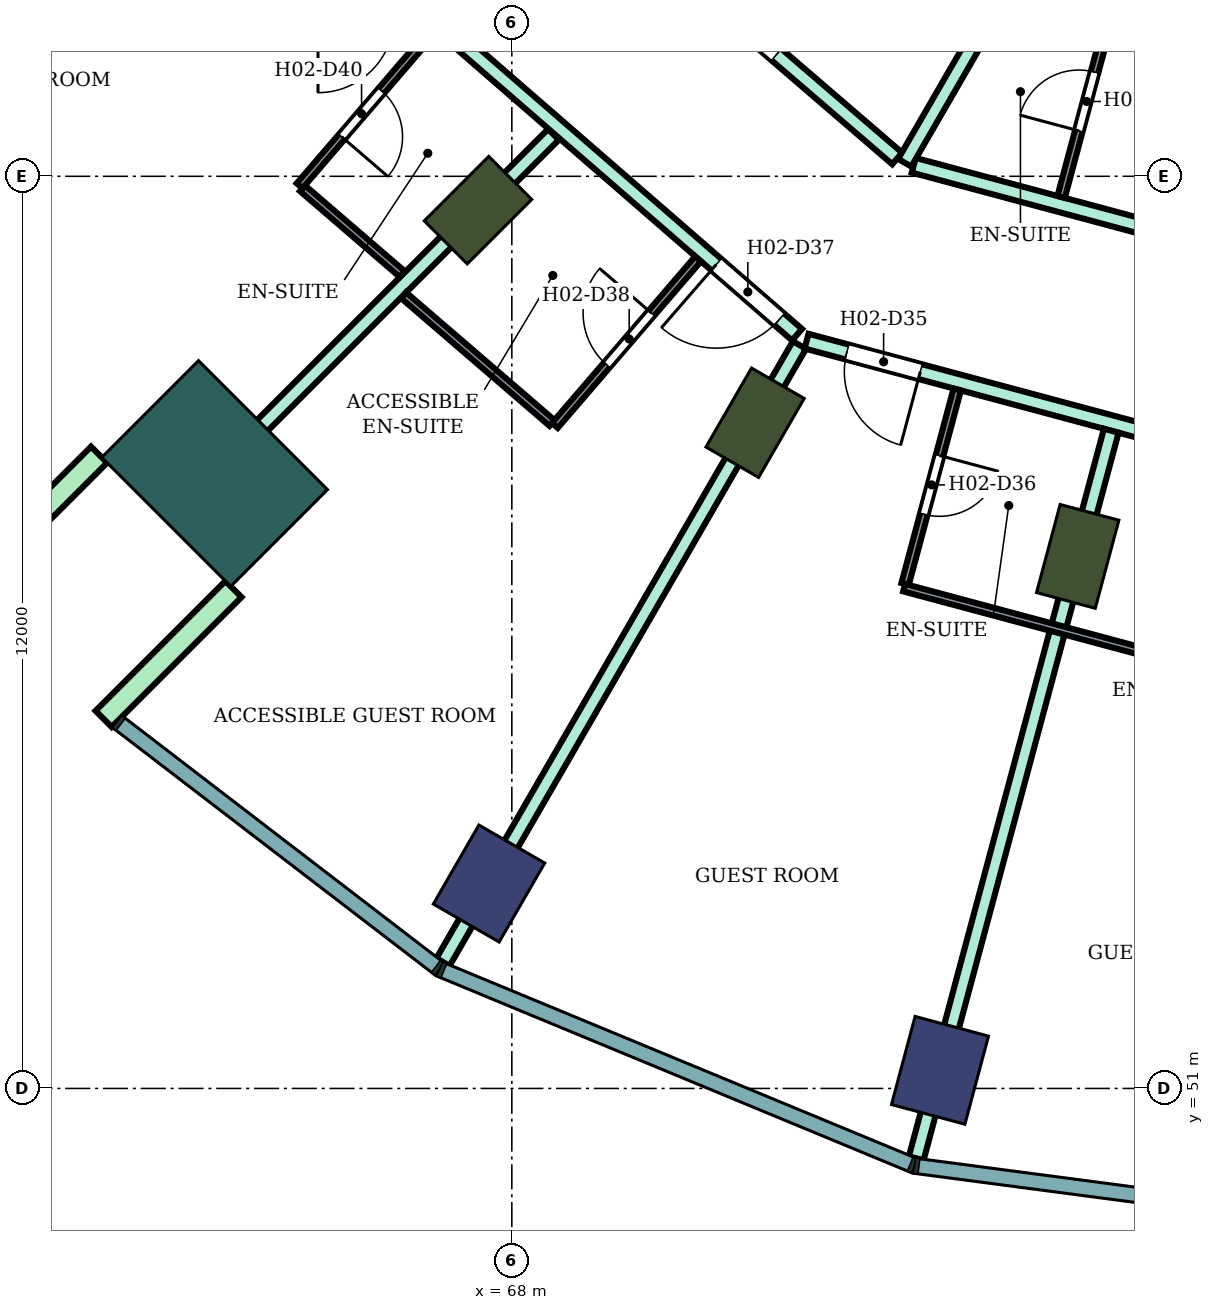
"""IFC4 building model, lengths in metres.
Left out: names, types, materials, properties, quantities, classifications, styles, units other than length and angle.
Written with IfcOpenShell. Run it as: python <this file> out.ifc"""

import sys

from ifc_helpers import new_model, si_unit, direction, frame, frame_2d, origin, origin_2d, place, context, subcontext, project, spatial, rectangle, extrude, element, fill, save


model = new_model("IFC4")
c1 = context("Model", 3, precision=1e-05, world=origin(), true_north=direction((0.0, 1.0)))
c2 = subcontext(c1, "Body", "Model", "MODEL_VIEW")
j1 = project(units=[si_unit("LENGTHUNIT", "METRE"), si_unit("PLANEANGLEUNIT", "RADIAN")], contexts=[c1])
p1 = place(None, origin())
s1 = spatial("IfcSite", under=j1, at=p1, CompositionType="ELEMENT")
p2 = place(p1, origin())
s2 = spatial("IfcBuilding", under=s1, at=p2, CompositionType="ELEMENT")
p3 = place(p2, frame((0.0, 0.0, 40.2)))
s3 = spatial("IfcBuildingStorey", under=s2, at=p3, CompositionType="ELEMENT", Elevation=40.2)
for number, where, z_axis, x_axis in (
    (1, (67.7, 53.696, 0.0), (0.0, 0.0, 1.0), (-0.5, -0.866, 0.0)),
    (2, (73.633, 51.238, 0.0), (0.0, 0.0, 1.0), (-0.259, -0.966, 0.0)),
):
    element("IfcColumn", number, at=place(p3, frame(where, z_axis=z_axis, x_axis=x_axis)), inside=s3, PredefinedType="COLUMN", context=c2, shape_type="SweptSolid", body=[
        extrude(rectangle(XDim=1.2, YDim=1.0, at=origin_2d()), origin(), (0.0, 0.0, 1.0), 3.8),
    ])
for number, where, z_axis, x_axis in (
    (3, (67.555, 62.555, 0.0), (0.0, 0.0, 1.0), (-0.707, -0.707, 0.0)),
    (4, (71.2, 59.758, 0.0), (0.0, 0.0, 1.0), (-0.5, -0.866, 0.0)),
    (5, (75.445, 58.0, 0.0), (0.0, 0.0, 1.0), (-0.259, -0.966, 0.0)),
):
    element("IfcColumn", number, at=place(p3, frame(where, z_axis=z_axis, x_axis=x_axis)), inside=s3, PredefinedType="COLUMN", context=c2, shape_type="SweptSolid", body=[
        extrude(rectangle(XDim=1.2, YDim=0.8, at=origin_2d()), origin(), (0.0, 0.0, 1.0), 3.8),
    ])
p4 = place(p3, frame((64.09, 59.09, 0.0), z_axis=(0.0, 0.0, 1.0), x_axis=(-0.707106781187, -0.707106781187, 0.0)))
e6 = element("IfcColumn", 6, at=p4, inside=s3, PredefinedType="COLUMN", context=c2, shape_type="SweptSolid", body=[
    extrude(rectangle(XDim=1.8, YDim=2.4, at=origin_2d()), origin(), (0.0, 0.0, 1.0), 3.8),
])
for number, where, z_axis, x_axis in (
    (7, (62.57, 59.338, 0.0), (0.0, 0.0, 1.0), (-0.707, -0.707, 0.0)),
    (8, (64.338, 57.57, 0.0), (0.0, 0.0, 1.0), (-0.707, -0.707, 0.0)),
):
    element("IfcWall", number, at=place(p3, frame(where, z_axis=z_axis, x_axis=x_axis)), inside=s3, PredefinedType="NOTDEFINED", context=c2, shape_type="SweptSolid", body=[
        extrude(rectangle(XDim=2.416, YDim=0.3, at=frame_2d((1.208, 0.0))), origin(), (0.0, 0.0, 1.0), 3.8),
    ])
p5 = place(p3, frame((63.594, 58.598, 0.0), z_axis=(0.0, 0.0, 1.0), x_axis=(0.707228748718, 0.706984792613, 0.0)))
e9 = element("IfcWall", 9, at=p5, inside=s3, PredefinedType="PARTITIONING", context=c2, shape_type="SweptSolid", body=[
    extrude(rectangle(XDim=7.005, YDim=0.2, at=frame_2d((3.503, 0.0))), origin(), (0.0, 0.0, 1.0), 3.35),
])
p6 = place(p3, frame((67.082, 64.972, 0.0), z_axis=(0.0, 0.0, 1.0), x_axis=(0.755033632617, -0.655686063309, 0.0)))
e10 = element("IfcWall", 10, at=p6, inside=s3, PredefinedType="PARTITIONING", context=c2, shape_type="SweptSolid", body=[
    extrude(rectangle(XDim=6.185, YDim=0.2, at=frame_2d((3.093, 0.0))), origin(), (0.0, 0.0, 1.0), 3.35),
])
p7 = place(p6, frame((4.778, 0.0, 0.0)))
e11 = element("IfcOpeningElement", 11, at=p7, cuts=e10, PredefinedType="OPENING", context=c2, shape_type="SweptSolid", body=[
    extrude(rectangle(XDim=1.1, YDim=2.1, at=frame_2d((0.55, 1.05))), frame((0.0, 0.11, 0.0), z_axis=(0.0, -1.0, 0.0), x_axis=(1.0, 0.0, 0.0)), (0.0, 0.0, 1.0), 0.22),
])
p8 = place(p3, frame((67.094, 52.663, 0.0), z_axis=(0.0, 0.0, 1.0), x_axis=(0.500216854217, 0.865900166738, 0.0)))
e12 = element("IfcWall", 12, at=p8, inside=s3, PredefinedType="PARTITIONING", context=c2, shape_type="SweptSolid", body=[
    extrude(rectangle(XDim=9.375, YDim=0.2, at=frame_2d((4.688, 0.0))), origin(), (0.0, 0.0, 1.0), 3.35),
])
p9 = place(p3, frame((69.158, 66.6, 0.0), z_axis=(0.0, 0.0, 1.0), x_axis=(0.758063092745, -0.652181222835, 0.0)))
e13 = element("IfcWall", 13, at=p9, inside=s3, PredefinedType="PARTITIONING", context=c2, shape_type="SweptSolid", body=[
    extrude(rectangle(XDim=5.16, YDim=0.2, at=frame_2d((2.58, 0.0))), origin(), (0.0, 0.0, 1.0), 3.35),
])
p10 = place(p9, frame((2.165, 0.0, 0.0)))
e14 = element("IfcOpeningElement", 14, at=p10, cuts=e13, PredefinedType="OPENING", context=c2, shape_type="SweptSolid", body=[
    extrude(rectangle(XDim=0.9, YDim=2.1, at=frame_2d((0.45, 1.05))), frame((0.0, 0.11, 0.0), z_axis=(0.0, -1.0, 0.0), x_axis=(1.0, 0.0, 0.0)), (0.0, 0.0, 1.0), 0.22),
])
p11 = place(p3, frame((71.877, 60.832, 0.0), z_axis=(0.0, 0.0, 1.0), x_axis=(0.965852509869, -0.259092510851, 0.0)))
e15 = element("IfcWall", 15, at=p11, inside=s3, PredefinedType="PARTITIONING", context=c2, shape_type="SweptSolid", body=[
    extrude(rectangle(XDim=8.32, YDim=0.2, at=frame_2d((4.16, 0.0))), origin(), (0.0, 0.0, 1.0), 3.35),
])
p12 = place(p11, frame((6.86, 0.0, 0.0)))
e16 = element("IfcOpeningElement", 16, at=p12, cuts=e15, PredefinedType="OPENING", context=c2, shape_type="SweptSolid", body=[
    extrude(rectangle(XDim=1.0, YDim=2.1, at=frame_2d((0.5, 1.05))), frame((0.0, 0.11, 0.0), z_axis=(0.0, -1.0, 0.0), x_axis=(1.0, 0.0, 0.0)), (0.0, 0.0, 1.0), 0.22),
])
p13 = place(p11, frame((0.55, 0.0, 0.0)))
e17 = element("IfcOpeningElement", 17, at=p13, cuts=e15, PredefinedType="OPENING", context=c2, shape_type="SweptSolid", body=[
    extrude(rectangle(XDim=1.0, YDim=2.1, at=frame_2d((0.5, 1.05))), frame((0.0, 0.11, 0.0), z_axis=(0.0, -1.0, 0.0), x_axis=(1.0, 0.0, 0.0)), (0.0, 0.0, 1.0), 0.22),
])
p14 = place(p3, frame((73.287, 63.145, 0.0), z_axis=(0.0, 0.0, 1.0), x_axis=(0.965854200194, -0.259086209526, 0.0)))
e18 = element("IfcWall", 18, at=p14, inside=s3, PredefinedType="PARTITIONING", context=c2, shape_type="SweptSolid", body=[
    extrude(rectangle(XDim=6.82, YDim=0.2, at=frame_2d((3.41, 0.0))), origin(), (0.0, 0.0, 1.0), 3.35),
])
p15 = place(p14, frame((5.4, 0.0, 0.0)))
e19 = element("IfcOpeningElement", 19, at=p15, cuts=e18, PredefinedType="OPENING", context=c2, shape_type="SweptSolid", body=[
    extrude(rectangle(XDim=1.0, YDim=2.1, at=frame_2d((0.5, 1.05))), frame((0.0, 0.11, 0.0), z_axis=(0.0, -1.0, 0.0), x_axis=(1.0, 0.0, 0.0)), (0.0, 0.0, 1.0), 0.22),
])
p16 = place(p3, frame((73.169, 63.178, 0.0), z_axis=(0.0, 0.0, 1.0), x_axis=(0.50020860964, 0.865904929448, 0.0)))
e20 = element("IfcWall", 20, at=p16, inside=s3, PredefinedType="PARTITIONING", context=c2, shape_type="SweptSolid", body=[
    extrude(rectangle(XDim=5.955, YDim=0.2, at=frame_2d((2.978, 0.0))), origin(), (0.0, 0.0, 1.0), 3.35),
])
p17 = place(p3, frame((73.321, 50.081, 0.0), z_axis=(0.0, 0.0, 1.0), x_axis=(0.25891218439, 0.965900864879, 0.0)))
e21 = element("IfcWall", 21, at=p17, inside=s3, PredefinedType="PARTITIONING", context=c2, shape_type="SweptSolid", body=[
    extrude(rectangle(XDim=9.909, YDim=0.2, at=frame_2d((4.955, 0.0))), origin(), (0.0, 0.0, 1.0), 3.35),
])
p18 = place(p3, frame((65.246, 62.842, 0.0), z_axis=(0.0, 0.0, 1.0), x_axis=(0.758030338995, -0.652219292234, 0.0)))
e22 = element("IfcWall", 22, at=p18, inside=s3, PredefinedType="PARTITIONING", context=c2, shape_type="SweptSolid", body=[
    extrude(rectangle(XDim=1.73, YDim=0.1, at=frame_2d((0.865, 0.0))), origin(), (0.0, 0.0, 1.0), 3.35),
])
p19 = place(p3, frame((65.208, 62.875, 0.0), z_axis=(0.0, 0.0, 1.0), x_axis=(0.65205430601, 0.758172264076, 0.0)))
e23 = element("IfcWall", 23, at=p19, inside=s3, PredefinedType="PARTITIONING", context=c2, shape_type="SweptSolid", body=[
    extrude(rectangle(XDim=2.8, YDim=0.1, at=frame_2d((1.4, 0.0))), origin(), (0.0, 0.0, 1.0), 3.35),
])
p20 = place(p19, frame((0.85, 0.0, 0.0)))
e24 = element("IfcOpeningElement", 24, at=p20, cuts=e23, PredefinedType="OPENING", context=c2, shape_type="SweptSolid", body=[
    extrude(rectangle(XDim=0.8, YDim=2.1, at=frame_2d((0.4, 1.05))), frame((0.0, 0.06, 0.0), z_axis=(0.0, -1.0, 0.0), x_axis=(1.0, 0.0, 0.0)), (0.0, 0.0, 1.0), 0.12),
])
p21 = place(p3, frame((66.576, 61.435, 0.0), z_axis=(0.0, 0.0, 1.0), x_axis=(0.757970550281, -0.652288774169, 0.0)))
e25 = element("IfcWall", 25, at=p21, inside=s3, PredefinedType="PARTITIONING", context=c2, shape_type="SweptSolid", body=[
    extrude(rectangle(XDim=2.576, YDim=0.1, at=frame_2d((1.288, 0.0))), origin(), (0.0, 0.0, 1.0), 3.35),
])
p22 = place(p3, frame((68.566, 59.722, 0.0), z_axis=(0.0, 0.0, 1.0), x_axis=(0.65193146671, 0.758277892803, 0.0)))
e26 = element("IfcWall", 26, at=p22, inside=s3, PredefinedType="PARTITIONING", context=c2, shape_type="SweptSolid", body=[
    extrude(rectangle(XDim=2.89, YDim=0.1, at=frame_2d((1.445, 0.0))), origin(), (0.0, 0.0, 1.0), 3.35),
])
p23 = place(p22, frame((1.05, 0.0, 0.0)))
e27 = element("IfcOpeningElement", 27, at=p23, cuts=e26, PredefinedType="OPENING", context=c2, shape_type="SweptSolid", body=[
    extrude(rectangle(XDim=0.9, YDim=2.1, at=frame_2d((0.45, 1.05))), frame((0.0, 0.06, 0.0), z_axis=(0.0, -1.0, 0.0), x_axis=(1.0, 0.0, 0.0)), (0.0, 0.0, 1.0), 0.12),
])
p24 = place(p3, frame((73.174, 57.636, 0.0), z_axis=(0.0, 0.0, 1.0), x_axis=(0.258952498977, 0.96589005755, 0.0)))
e28 = element("IfcWall", 28, at=p24, inside=s3, PredefinedType="PARTITIONING", context=c2, shape_type="SweptSolid", body=[
    extrude(rectangle(XDim=2.65, YDim=0.1, at=frame_2d((1.325, 0.0))), origin(), (0.0, 0.0, 1.0), 3.35),
])
p25 = place(p24, frame((0.95, 0.0, 0.0)))
e29 = element("IfcOpeningElement", 29, at=p25, cuts=e28, PredefinedType="OPENING", context=c2, shape_type="SweptSolid", body=[
    extrude(rectangle(XDim=0.8, YDim=2.1, at=frame_2d((0.4, 1.05))), frame((0.0, 0.06, 0.0), z_axis=(0.0, -1.0, 0.0), x_axis=(1.0, 0.0, 0.0)), (0.0, 0.0, 1.0), 0.12),
])
p26 = place(p3, frame((73.161, 57.588, 0.0), z_axis=(0.0, 0.0, 1.0), x_axis=(0.965858994467, -0.259068336173, 0.0)))
e30 = element("IfcWall", 30, at=p26, inside=s3, PredefinedType="PARTITIONING", context=c2, shape_type="SweptSolid", body=[
    extrude(rectangle(XDim=4.15, YDim=0.1, at=frame_2d((2.075, 0.0))), origin(), (0.0, 0.0, 1.0), 3.35),
])
p27 = place(p3, frame((75.227, 62.729, 0.0), z_axis=(0.0, 0.0, 1.0), x_axis=(0.258945475746, 0.965891940432, 0.0)))
e31 = element("IfcWall", 31, at=p27, inside=s3, PredefinedType="PARTITIONING", context=c2, shape_type="SweptSolid", body=[
    extrude(rectangle(XDim=2.7, YDim=0.1, at=frame_2d((1.35, 0.0))), origin(), (0.0, 0.0, 1.0), 3.35),
])
p28 = place(p27, frame((0.9, 0.0, 0.0)))
e32 = element("IfcOpeningElement", 32, at=p28, cuts=e31, PredefinedType="OPENING", context=c2, shape_type="SweptSolid", body=[
    extrude(rectangle(XDim=0.8, YDim=2.1, at=frame_2d((0.4, 1.05))), frame((0.0, 0.06, 0.0), z_axis=(0.0, -1.0, 0.0), x_axis=(1.0, 0.0, 0.0)), (0.0, 0.0, 1.0), 0.12),
])
p29 = place(p13, frame((1.0, 0.0, 0.0), z_axis=(0.0, 0.0, 1.0), x_axis=(-1.0, 0.0, 0.0)))
e33 = element("IfcDoor", 33, at=p29, inside=s3, OperationType="SINGLE_SWING_LEFT", PredefinedType="DOOR", context=c2, shape_type="SweptSolid", body=[
    extrude(rectangle(XDim=1.0, YDim=2.1, at=frame_2d((0.5, 1.05))), frame((0.0, 0.025, 0.0), z_axis=(0.0, -1.0, 0.0), x_axis=(1.0, 0.0, 0.0)), (0.0, 0.0, 1.0), 0.05),
])
fill(e17, e33)
p30 = place(p25, frame((0.8, 0.0, 0.0), z_axis=(0.0, 0.0, 1.0), x_axis=(-1.0, 0.0, 0.0)))
e34 = element("IfcDoor", 34, at=p30, inside=s3, OperationType="SINGLE_SWING_LEFT", PredefinedType="DOOR", context=c2, shape_type="SweptSolid", body=[
    extrude(rectangle(XDim=0.8, YDim=2.1, at=frame_2d((0.4, 1.05))), frame((0.0, 0.025, 0.0), z_axis=(0.0, -1.0, 0.0), x_axis=(1.0, 0.0, 0.0)), (0.0, 0.0, 1.0), 0.05),
])
fill(e29, e34)
p31 = place(p7, frame((1.1, 0.0, 0.0), z_axis=(0.0, 0.0, 1.0), x_axis=(-1.0, 0.0, 0.0)))
e35 = element("IfcDoor", 35, at=p31, inside=s3, OperationType="SINGLE_SWING_RIGHT", PredefinedType="DOOR", context=c2, shape_type="SweptSolid", body=[
    extrude(rectangle(XDim=1.1, YDim=2.1, at=frame_2d((0.55, 1.05))), frame((0.0, 0.025, 0.0), z_axis=(0.0, -1.0, 0.0), x_axis=(1.0, 0.0, 0.0)), (0.0, 0.0, 1.0), 0.05),
])
fill(e11, e35)
p32 = place(p23, origin())
e36 = element("IfcDoor", 36, at=p32, inside=s3, OperationType="SINGLE_SWING_RIGHT", PredefinedType="DOOR", context=c2, shape_type="SweptSolid", body=[
    extrude(rectangle(XDim=0.9, YDim=2.1, at=frame_2d((0.45, 1.05))), frame((0.0, 0.025, 0.0), z_axis=(0.0, -1.0, 0.0), x_axis=(1.0, 0.0, 0.0)), (0.0, 0.0, 1.0), 0.05),
])
fill(e27, e36)
p33 = place(p20, frame((0.8, 0.0, 0.0), z_axis=(0.0, 0.0, 1.0), x_axis=(-1.0, 0.0, 0.0)))
e37 = element("IfcDoor", 37, at=p33, inside=s3, OperationType="SINGLE_SWING_RIGHT", PredefinedType="DOOR", context=c2, shape_type="SweptSolid", body=[
    extrude(rectangle(XDim=0.8, YDim=2.1, at=frame_2d((0.4, 1.05))), frame((0.0, 0.025, 0.0), z_axis=(0.0, -1.0, 0.0), x_axis=(1.0, 0.0, 0.0)), (0.0, 0.0, 1.0), 0.05),
])
fill(e24, e37)
p34 = place(p28, origin())
e38 = element("IfcDoor", 38, at=p34, inside=s3, OperationType="SINGLE_SWING_LEFT", PredefinedType="DOOR", context=c2, shape_type="SweptSolid", body=[
    extrude(rectangle(XDim=0.8, YDim=2.1, at=frame_2d((0.4, 1.05))), frame((0.0, 0.025, 0.0), z_axis=(0.0, -1.0, 0.0), x_axis=(1.0, 0.0, 0.0)), (0.0, 0.0, 1.0), 0.05),
])
fill(e32, e38)
p35 = place(p10, origin())
e39 = element("IfcDoor", 39, at=p35, inside=s3, OperationType="SINGLE_SWING_LEFT", PredefinedType="DOOR", context=c2, shape_type="SweptSolid", body=[
    extrude(rectangle(XDim=0.9, YDim=2.1, at=frame_2d((0.45, 1.05))), frame((0.0, 0.025, 0.0), z_axis=(0.0, -1.0, 0.0), x_axis=(1.0, 0.0, 0.0)), (0.0, 0.0, 1.0), 0.05),
])
fill(e14, e39)
save(model, sys.argv[1])
